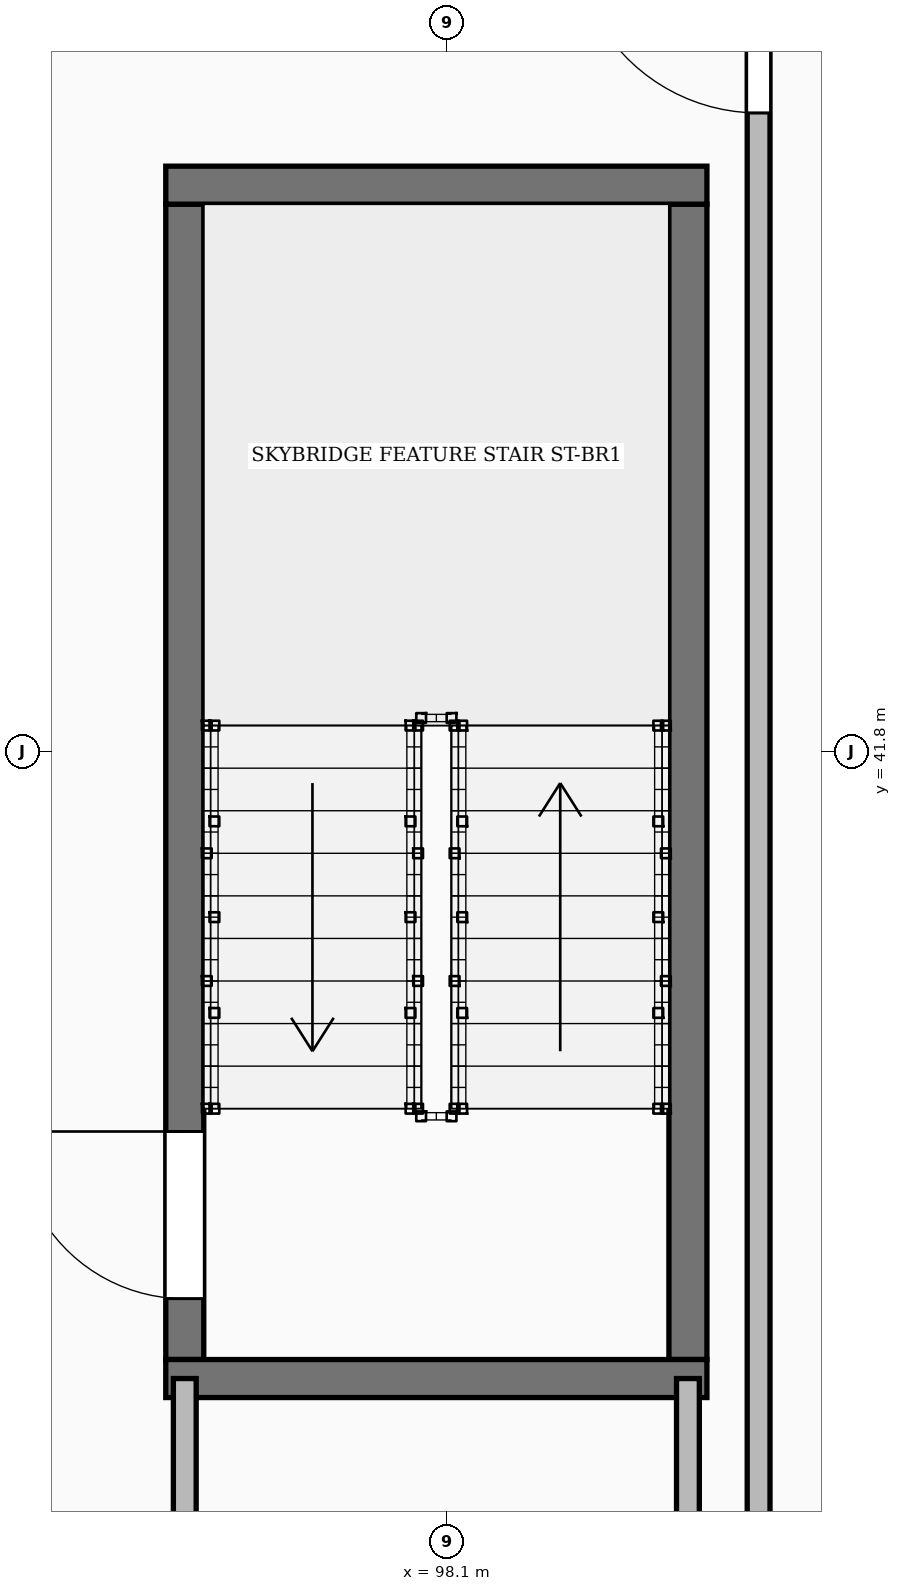
"""IFC4 building model, lengths in metres.
Left out: names, types, materials, properties, quantities, classifications, styles, units other than length and angle.
Written with IfcOpenShell. Run it as: python <this file> out.ifc"""

import sys

from ifc_helpers import new_model, si_unit, direction, frame, frame_2d, origin, place, context, subcontext, project, spatial, rectangle, extrude, element, fill, save


model = new_model("IFC4")
c1 = context("Model", 3, precision=1e-05, world=origin(), true_north=direction((0.0, 1.0)))
c2 = subcontext(c1, "Body", "Model", "MODEL_VIEW")
j1 = project(units=[si_unit("LENGTHUNIT", "METRE"), si_unit("PLANEANGLEUNIT", "RADIAN")], contexts=[c1])
p1 = place(None, origin())
s1 = spatial("IfcSite", under=j1, at=p1, CompositionType="ELEMENT")
p2 = place(p1, origin())
s2 = spatial("IfcBuilding", under=s1, at=p2, CompositionType="ELEMENT")
p3 = place(p2, frame((0.0, 0.0, 139.3)))
s3 = spatial("IfcBuildingStorey", under=s2, at=p3, CompositionType="ELEMENT", Elevation=139.3)
p4 = place(p3, frame((96.375, 37.8, 0.0), z_axis=(0.0, 0.0, 1.0), x_axis=(0.0, 1.0, 0.0)))
e1 = element("IfcWall", 1, at=p4, inside=s3, PredefinedType="SHEAR", context=c2, shape_type="SweptSolid", body=[
    extrude(rectangle(XDim=7.6, YDim=0.25, at=frame_2d((3.8, 0.0))), origin(), (0.0, 0.0, 1.0), 3.6),
])
p5 = place(p4, frame((0.4, 0.0, 0.0)))
e2 = element("IfcOpeningElement", 2, at=p5, cuts=e1, PredefinedType="OPENING", context=c2, shape_type="SweptSolid", body=[
    extrude(rectangle(XDim=1.1, YDim=2.1, at=frame_2d((0.55, 1.05))), frame((0.0, 0.135, 0.0), z_axis=(0.0, -1.0, 0.0), x_axis=(1.0, 0.0, 0.0)), (0.0, 0.0, 1.0), 0.27),
])
p6 = place(p3, frame((99.685, 37.8, 0.0), z_axis=(0.0, 0.0, 1.0), x_axis=(0.0, 1.0, 0.0)))
e3 = element("IfcWall", 3, at=p6, inside=s3, PredefinedType="SHEAR", context=c2, shape_type="SweptSolid", body=[
    extrude(rectangle(XDim=7.6, YDim=0.25, at=frame_2d((3.8, 0.0))), origin(), (0.0, 0.0, 1.0), 3.6),
])
for number, where, z_axis, x_axis in (
    (4, (96.25, 37.675, 0.0), (0.0, 0.0, 1.0), (1.0, 0.0, 0.0)),
    (5, (96.25, 45.525, 0.0), (0.0, 0.0, 1.0), (1.0, 0.0, 0.0)),
):
    element("IfcWall", number, at=place(p3, frame(where, z_axis=z_axis, x_axis=x_axis)), inside=s3, PredefinedType="SHEAR", context=c2, shape_type="SweptSolid", body=[
        extrude(rectangle(XDim=3.56, YDim=0.25, at=frame_2d((1.78, 0.0))), origin(), (0.0, 0.0, 1.0), 3.6),
    ])
p7 = place(p3, frame((96.375, 32.95, 0.0), z_axis=(0.0, 0.0, 1.0), x_axis=(0.0, 1.0, 0.0)))
e6 = element("IfcWall", 6, at=p7, inside=s3, PredefinedType="PARTITIONING", context=c2, shape_type="SweptSolid", body=[
    extrude(rectangle(XDim=4.725, YDim=0.15, at=frame_2d((2.363, 0.0))), origin(), (0.0, 0.0, 1.0), 2.383),
])
p8 = place(p7, frame((1.6, 0.0, 0.0)))
e7 = element("IfcOpeningElement", 7, at=p8, cuts=e6, PredefinedType="OPENING", context=c2, shape_type="SweptSolid", body=[
    extrude(rectangle(XDim=0.96, YDim=2.1, at=frame_2d((0.48, 1.05))), frame((0.0, 0.085, 0.0), z_axis=(0.0, -1.0, 0.0), x_axis=(1.0, 0.0, 0.0)), (0.0, 0.0, 1.0), 0.17),
])
p9 = place(p3, frame((99.685, 32.95, 0.0), z_axis=(0.0, 0.0, 1.0), x_axis=(0.0, 1.0, 0.0)))
e8 = element("IfcWall", 8, at=p9, inside=s3, PredefinedType="PARTITIONING", context=c2, shape_type="SweptSolid", body=[
    extrude(rectangle(XDim=4.725, YDim=0.15, at=frame_2d((2.363, 0.0))), origin(), (0.0, 0.0, 1.0), 2.383),
])
p10 = place(p3, frame((100.15, 32.9, 0.0), z_axis=(0.0, 0.0, 1.0), x_axis=(0.0, 1.0, 0.0)))
e9 = element("IfcWall", 9, at=p10, inside=s3, PredefinedType="PARTITIONING", context=c2, shape_type="SweptSolid", body=[
    extrude(rectangle(XDim=17.8, YDim=0.15, at=frame_2d((8.9, 0.0))), origin(), (0.0, 0.0, 1.0), 3.31),
])
p11 = place(p10, frame((13.1, 0.0, 0.0)))
e10 = element("IfcOpeningElement", 10, at=p11, cuts=e9, PredefinedType="OPENING", context=c2, shape_type="SweptSolid", body=[
    extrude(rectangle(XDim=1.22, YDim=2.18, at=frame_2d((0.61, 1.09))), frame((0.0, 0.085, 0.0), z_axis=(0.0, -1.0, 0.0), x_axis=(1.0, 0.0, 0.0)), (0.0, 0.0, 1.0), 0.17),
])
p12 = place(p5, origin())
e11 = element("IfcDoor", 11, at=p12, inside=s3, OperationType="SINGLE_SWING_RIGHT", PredefinedType="DOOR", context=c2, shape_type="SweptSolid", body=[
    extrude(rectangle(XDim=1.1, YDim=2.1, at=frame_2d((0.55, 1.05))), frame((0.0, 0.025, 0.0), z_axis=(0.0, -1.0, 0.0), x_axis=(1.0, 0.0, 0.0)), (0.0, 0.0, 1.0), 0.05),
])
fill(e2, e11)
p13 = place(p11, origin())
e12 = element("IfcDoor", 12, at=p13, inside=s3, OperationType="SINGLE_SWING_RIGHT", PredefinedType="DOOR", context=c2, shape_type="SweptSolid", body=[
    extrude(rectangle(XDim=1.22, YDim=2.18, at=frame_2d((0.61, 1.09))), frame((0.0, 0.025, 0.0), z_axis=(0.0, -1.0, 0.0), x_axis=(1.0, 0.0, 0.0)), (0.0, 0.0, 1.0), 0.05),
])
fill(e10, e12)
save(model, sys.argv[1])
